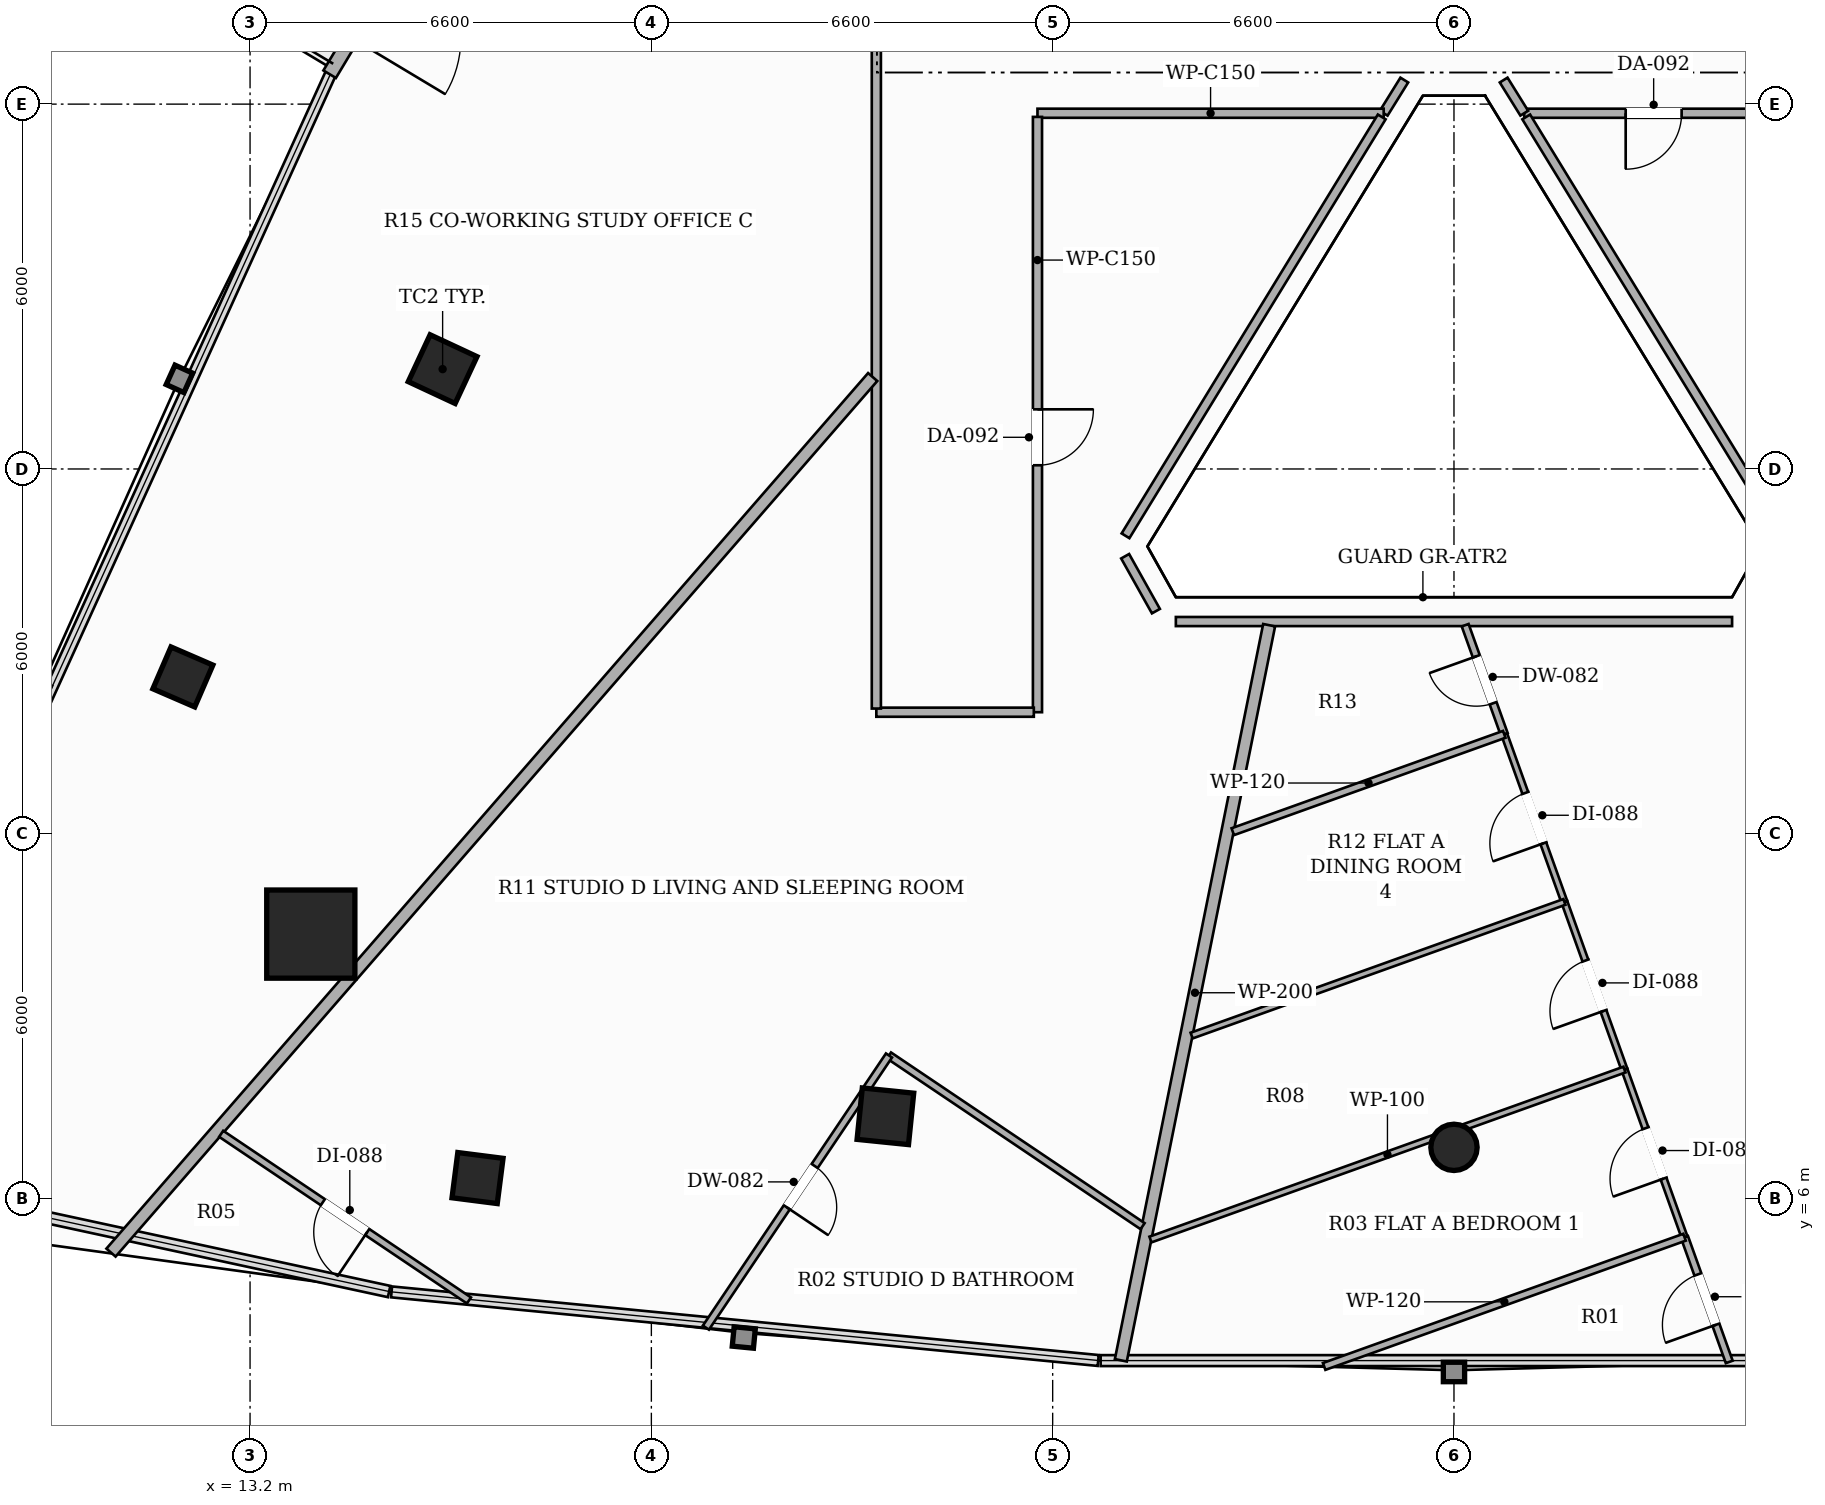
"""IFC4 building model, lengths in metres.
Left out: names, types, materials, properties, quantities, classifications, styles, units other than length and angle.
Written with IfcOpenShell. Run it as: python <this file> out.ifc"""

import sys

from ifc_helpers import new_model, si_unit, direction, frame, frame_2d, origin, origin_2d, place, context, subcontext, project, spatial, rectangle, hollow_rectangle, hollow_circle, extrude, element, fill, save


model = new_model("IFC4")
c1 = context("Model", 3, precision=1e-05, world=origin(), true_north=direction((0.0, 1.0)))
c2 = subcontext(c1, "Body", "Model", "MODEL_VIEW")
j1 = project(units=[si_unit("LENGTHUNIT", "METRE"), si_unit("PLANEANGLEUNIT", "RADIAN")], contexts=[c1])
p1 = place(None, origin())
s1 = spatial("IfcSite", under=j1, at=p1, CompositionType="ELEMENT")
p2 = place(p1, origin())
s2 = spatial("IfcBuilding", under=s1, at=p2, CompositionType="ELEMENT")
p3 = place(p2, frame((0.0, 0.0, 136.4)))
s3 = spatial("IfcBuildingStorey", under=s2, at=p3, CompositionType="ELEMENT", Elevation=136.4)
p4 = place(p3, frame((14.199, 10.351, 0.0), z_axis=(0.0, 0.0, 1.0), x_axis=(1.0, 0.0, 0.0)))
e1 = element("IfcColumn", 1, at=p4, inside=s3, PredefinedType="COLUMN", context=c2, shape_type="SweptSolid", body=[
    extrude(hollow_rectangle(XDim=1.45, YDim=1.45, WallThickness=0.045, at=origin_2d()), origin(), (0.0, 0.0, 1.0), 3.3),
])
for number, where, z_axis, x_axis in (
    (2, (16.367, 19.642, 0.0), (0.0, 0.0, 1.0), (0.423, 0.906, 0.0)),
    (3, (23.649, 7.355, 0.0), (0.0, 0.0, 1.0), (-0.995, 0.101, 0.0)),
):
    element("IfcColumn", number, at=place(p3, frame(where, z_axis=z_axis, x_axis=x_axis)), inside=s3, PredefinedType="COLUMN", context=c2, shape_type="SweptSolid", body=[
        extrude(hollow_rectangle(XDim=0.85, YDim=0.85, WallThickness=0.028, at=origin_2d()), origin(), (0.0, 0.0, 1.0), 3.3),
    ])
p5 = place(p3, frame((33.0, 6.844, 0.0), z_axis=(0.0, 0.0, 1.0), x_axis=(1.0, 0.0, 0.0)))
e4 = element("IfcColumn", 4, at=p5, inside=s3, PredefinedType="COLUMN", context=c2, shape_type="SweptSolid", body=[
    extrude(hollow_circle(Radius=0.381, WallThickness=0.022, at=origin_2d()), origin(), (0.0, 0.0, 1.0), 3.3),
])
for number, where, z_axis, x_axis in (
    (5, (12.095, 14.58, 0.0), (0.0, 0.0, 1.0), (0.397, 0.918, 0.0)),
    (6, (16.941, 6.339, 0.0), (0.0, 0.0, 1.0), (-0.992, 0.127, 0.0)),
):
    element("IfcColumn", number, at=place(p3, frame(where, z_axis=z_axis, x_axis=x_axis)), inside=s3, PredefinedType="COLUMN", context=c2, shape_type="SweptSolid", body=[
        extrude(hollow_rectangle(XDim=0.75, YDim=0.75, WallThickness=0.025, at=origin_2d()), origin(), (0.0, 0.0, 1.0), 3.3),
    ])
p6 = place(p3, frame((20.408, 34.327, 0.0), z_axis=(0.0, 0.0, 1.0), x_axis=(-0.514364263751, -0.857571807009, 0.0)))
e7 = element("IfcWall", 7, at=p6, inside=s3, PredefinedType="SOLIDWALL", context=c2, shape_type="SweptSolid", body=[
    extrude(rectangle(XDim=11.468, YDim=0.24, at=frame_2d((5.734, 0.0))), origin(), (0.0, 0.0, 1.0), 2.624),
])
p7 = place(p6, frame((8.972, 0.0, 0.0)))
e8 = element("IfcOpeningElement", 8, at=p7, cuts=e7, PredefinedType="OPENING", context=c2, shape_type="SweptSolid", body=[
    extrude(rectangle(XDim=1.8, YDim=2.2, at=frame_2d((0.9, 1.1))), frame((0.0, 0.13, 0.0), z_axis=(0.0, -1.0, 0.0), x_axis=(1.0, 0.0, 0.0)), (0.0, 0.0, 1.0), 0.26),
])
p8 = place(p3, frame((32.183, 24.396, 0.0), z_axis=(0.0, 0.0, 1.0), x_axis=(-0.527674894897, -0.849446411079, 0.0)))
e9 = element("IfcWall", 9, at=p8, inside=s3, PredefinedType="PARTITIONING", context=c2, shape_type="SweptSolid", body=[
    extrude(rectangle(XDim=0.643, YDim=0.15, at=frame_2d((0.321, 0.0))), origin(), (0.0, 0.0, 1.0), 3.06),
])
p9 = place(p3, frame((31.844, 23.85, 0.0), z_axis=(0.0, 0.0, 1.0), x_axis=(-1.0, 0.0, 0.0)))
e10 = element("IfcWall", 10, at=p9, inside=s3, PredefinedType="PARTITIONING", context=c2, shape_type="SweptSolid", body=[
    extrude(rectangle(XDim=5.694, YDim=0.15, at=frame_2d((2.847, 0.0))), origin(), (0.0, 0.0, 1.0), 2.721),
])
p10 = place(p3, frame((26.15, 23.79, 0.0), z_axis=(0.0, 0.0, 1.0), x_axis=(0.0, -1.0, 0.0)))
e11 = element("IfcWall", 11, at=p10, inside=s3, PredefinedType="PARTITIONING", context=c2, shape_type="SweptSolid", body=[
    extrude(rectangle(XDim=9.79, YDim=0.15, at=frame_2d((4.895, 0.0))), origin(), (0.0, 0.0, 1.0), 2.721),
])
p11 = place(p10, frame((4.809, 0.0, 0.0)))
e12 = element("IfcOpeningElement", 12, at=p11, cuts=e11, PredefinedType="OPENING", context=c2, shape_type="SweptSolid", body=[
    extrude(rectangle(XDim=0.92, YDim=2.15, at=frame_2d((0.46, 1.075))), frame((0.0, 0.085, 0.0), z_axis=(0.0, -1.0, 0.0), x_axis=(1.0, 0.0, 0.0)), (0.0, 0.0, 1.0), 0.17),
])
p12 = place(p3, frame((26.09, 14.0, 0.0), z_axis=(0.0, 0.0, 1.0), x_axis=(-1.0, 0.0, 0.0)))
e13 = element("IfcWall", 13, at=p12, inside=s3, PredefinedType="PARTITIONING", context=c2, shape_type="SweptSolid", body=[
    extrude(rectangle(XDim=2.59, YDim=0.15, at=frame_2d((1.295, 0.0))), origin(), (0.0, 0.0, 1.0), 2.721),
])
p13 = place(p3, frame((23.5, 14.06, 0.0), z_axis=(0.0, 0.0, 1.0), x_axis=(0.0, 1.0, 0.0)))
e14 = element("IfcWall", 14, at=p13, inside=s3, PredefinedType="PARTITIONING", context=c2, shape_type="SweptSolid", body=[
    extrude(rectangle(XDim=22.84, YDim=0.15, at=frame_2d((11.42, 0.0))), origin(), (0.0, 0.0, 1.0), 2.413),
])
p14 = place(p13, frame((13.533, 0.0, 0.0)))
e15 = element("IfcOpeningElement", 15, at=p14, cuts=e14, PredefinedType="OPENING", context=c2, shape_type="SweptSolid", body=[
    extrude(rectangle(XDim=0.88, YDim=2.1, at=frame_2d((0.44, 1.05))), frame((0.0, 0.085, 0.0), z_axis=(0.0, -1.0, 0.0), x_axis=(1.0, 0.0, 0.0)), (0.0, 0.0, 1.0), 0.17),
])
p15 = place(p3, frame((42.29, 23.85, 0.0), z_axis=(0.0, 0.0, 1.0), x_axis=(-1.0, 0.0, 0.0)))
e16 = element("IfcWall", 16, at=p15, inside=s3, PredefinedType="PARTITIONING", context=c2, shape_type="SweptSolid", body=[
    extrude(rectangle(XDim=8.134, YDim=0.15, at=frame_2d((4.067, 0.0))), origin(), (0.0, 0.0, 1.0), 2.492),
])
p16 = place(p15, frame((5.546, 0.0, 0.0)))
e17 = element("IfcOpeningElement", 17, at=p16, cuts=e16, PredefinedType="OPENING", context=c2, shape_type="SweptSolid", body=[
    extrude(rectangle(XDim=0.92, YDim=2.15, at=frame_2d((0.46, 1.075))), frame((0.0, 0.085, 0.0), z_axis=(0.0, -1.0, 0.0), x_axis=(1.0, 0.0, 0.0)), (0.0, 0.0, 1.0), 0.17),
])
p17 = place(p15, frame((1.807, 0.0, 0.0)))
e18 = element("IfcOpeningElement", 18, at=p17, cuts=e16, PredefinedType="OPENING", context=c2, shape_type="SweptSolid", body=[
    extrude(rectangle(XDim=0.92, YDim=2.15, at=frame_2d((0.46, 1.075))), frame((0.0, 0.085, 0.0), z_axis=(0.0, -1.0, 0.0), x_axis=(1.0, 0.0, 0.0)), (0.0, 0.0, 1.0), 0.17),
])
p18 = place(p3, frame((34.156, 23.851, 0.0), z_axis=(0.0, 0.0, 1.0), x_axis=(-0.528356729584, 0.849022476913, 0.0)))
e19 = element("IfcWall", 19, at=p18, inside=s3, PredefinedType="PARTITIONING", context=c2, shape_type="SweptSolid", body=[
    extrude(rectangle(XDim=0.642, YDim=0.15, at=frame_2d((0.321, 0.0))), origin(), (0.0, 0.0, 1.0), 3.06),
])
p19 = place(p3, frame((34.188, 23.79, 0.0), z_axis=(0.0, 0.0, 1.0), x_axis=(0.521816809014, -0.853057570057, 0.0)))
e20 = element("IfcWall", 20, at=p19, inside=s3, PredefinedType="PARTITIONING", context=c2, shape_type="SweptSolid", body=[
    extrude(rectangle(XDim=8.076, YDim=0.15, at=frame_2d((4.038, 0.0))), origin(), (0.0, 0.0, 1.0), 2.721),
])
p20 = place(p3, frame((37.574, 15.491, 0.0), z_axis=(0.0, 0.0, 1.0), x_axis=(-1.0, 0.0, 0.0)))
e21 = element("IfcWall", 21, at=p20, inside=s3, PredefinedType="PARTITIONING", context=c2, shape_type="SweptSolid", body=[
    extrude(rectangle(XDim=9.148, YDim=0.15, at=frame_2d((4.574, 0.0))), origin(), (0.0, 0.0, 1.0), 2.721),
])
p21 = place(p3, frame((28.098, 15.662, 0.0), z_axis=(0.0, 0.0, 1.0), x_axis=(-0.488804496818, 0.872393353878, 0.0)))
e22 = element("IfcWall", 22, at=p21, inside=s3, PredefinedType="PARTITIONING", context=c2, shape_type="SweptSolid", body=[
    extrude(rectangle(XDim=1.035, YDim=0.15, at=frame_2d((0.518, 0.0))), origin(), (0.0, 0.0, 1.0), 3.06),
])
p22 = place(p3, frame((27.598, 16.901, 0.0), z_axis=(0.0, 0.0, 1.0), x_axis=(0.521816809014, 0.853057570057, 0.0)))
e23 = element("IfcWall", 23, at=p22, inside=s3, PredefinedType="PARTITIONING", context=c2, shape_type="SweptSolid", body=[
    extrude(rectangle(XDim=8.076, YDim=0.15, at=frame_2d((4.038, 0.0))), origin(), (0.0, 0.0, 1.0), 2.721),
])
p23 = place(p3, frame((27.521, 3.342, 0.0), z_axis=(0.0, 0.0, 1.0), x_axis=(0.197768112081, 0.980248832615, 0.0)))
e24 = element("IfcWall", 24, at=p23, inside=s3, PredefinedType="PARTITIONING", context=c2, shape_type="SweptSolid", body=[
    extrude(rectangle(XDim=12.333, YDim=0.2, at=frame_2d((6.166, 0.0))), origin(), (0.0, 0.0, 1.0), 2.413),
])
p24 = place(p3, frame((23.44, 19.512, 0.0), z_axis=(0.0, 0.0, 1.0), x_axis=(-0.656359216658, -0.754448526215, 0.0)))
e25 = element("IfcWall", 25, at=p24, inside=s3, PredefinedType="PARTITIONING", context=c2, shape_type="SweptSolid", body=[
    extrude(rectangle(XDim=19.085, YDim=0.2, at=frame_2d((9.543, 0.0))), origin(), (0.0, 0.0, 1.0), 2.413),
])
p25 = place(p3, frame((33.827, 13.636, 0.0), z_axis=(0.0, 0.0, 1.0), x_axis=(-0.337163686904, 0.941446041063, 0.0)))
e26 = element("IfcWall", 26, at=p25, inside=s3, PredefinedType="PARTITIONING", context=c2, shape_type="SweptSolid", body=[
    extrude(rectangle(XDim=1.906, YDim=0.12, at=frame_2d((0.953, 0.0))), origin(), (0.0, 0.0, 1.0), 2.721),
])
p26 = place(p25, frame((0.543, 0.0, 0.0)))
e27 = element("IfcOpeningElement", 27, at=p26, cuts=e26, PredefinedType="OPENING", context=c2, shape_type="SweptSolid", body=[
    extrude(rectangle(XDim=0.82, YDim=2.1, at=frame_2d((0.41, 1.05))), frame((0.0, 0.07, 0.0), z_axis=(0.0, -1.0, 0.0), x_axis=(1.0, 0.0, 0.0)), (0.0, 0.0, 1.0), 0.14),
])
p27 = place(p3, frame((37.527, 3.315, 0.0), z_axis=(0.0, 0.0, 1.0), x_axis=(-0.337393850622, 0.9413635799, 0.0)))
e28 = element("IfcWall", 28, at=p27, inside=s3, PredefinedType="PARTITIONING", context=c2, shape_type="SweptSolid", body=[
    extrude(rectangle(XDim=2.179, YDim=0.12, at=frame_2d((1.089, 0.0))), origin(), (0.0, 0.0, 1.0), 3.06),
])
p28 = place(p27, frame((0.649, 0.0, 0.0)))
e29 = element("IfcOpeningElement", 29, at=p28, cuts=e28, PredefinedType="OPENING", context=c2, shape_type="SweptSolid", body=[
    extrude(rectangle(XDim=0.88, YDim=2.1, at=frame_2d((0.44, 1.05))), frame((0.0, 0.07, 0.0), z_axis=(0.0, -1.0, 0.0), x_axis=(1.0, 0.0, 0.0)), (0.0, 0.0, 1.0), 0.14),
])
p29 = place(p3, frame((36.792, 5.366, 0.0), z_axis=(0.0, 0.0, 1.0), x_axis=(-0.33735537207, 0.941377370099, 0.0)))
e30 = element("IfcWall", 30, at=p29, inside=s3, PredefinedType="PARTITIONING", context=c2, shape_type="SweptSolid", body=[
    extrude(rectangle(XDim=2.929, YDim=0.1, at=frame_2d((1.464, 0.0))), origin(), (0.0, 0.0, 1.0), 2.413),
])
p30 = place(p29, frame((1.024, 0.0, 0.0)))
e31 = element("IfcOpeningElement", 31, at=p30, cuts=e30, PredefinedType="OPENING", context=c2, shape_type="SweptSolid", body=[
    extrude(rectangle(XDim=0.88, YDim=2.1, at=frame_2d((0.44, 1.05))), frame((0.0, 0.06, 0.0), z_axis=(0.0, -1.0, 0.0), x_axis=(1.0, 0.0, 0.0)), (0.0, 0.0, 1.0), 0.12),
])
p31 = place(p3, frame((35.804, 8.123, 0.0), z_axis=(0.0, 0.0, 1.0), x_axis=(-0.337381847176, 0.941367881965, 0.0)))
e32 = element("IfcWall", 32, at=p31, inside=s3, PredefinedType="PARTITIONING", context=c2, shape_type="SweptSolid", body=[
    extrude(rectangle(XDim=2.928, YDim=0.1, at=frame_2d((1.464, 0.0))), origin(), (0.0, 0.0, 1.0), 3.06),
])
p32 = place(p31, frame((1.024, 0.0, 0.0)))
e33 = element("IfcOpeningElement", 33, at=p32, cuts=e32, PredefinedType="OPENING", context=c2, shape_type="SweptSolid", body=[
    extrude(rectangle(XDim=0.88, YDim=2.1, at=frame_2d((0.44, 1.05))), frame((0.0, 0.06, 0.0), z_axis=(0.0, -1.0, 0.0), x_axis=(1.0, 0.0, 0.0)), (0.0, 0.0, 1.0), 0.12),
])
p33 = place(p3, frame((34.816, 10.88, 0.0), z_axis=(0.0, 0.0, 1.0), x_axis=(-0.337756804272, 0.941233414817, 0.0)))
e34 = element("IfcWall", 34, at=p33, inside=s3, PredefinedType="PARTITIONING", context=c2, shape_type="SweptSolid", body=[
    extrude(rectangle(XDim=2.928, YDim=0.1, at=frame_2d((1.464, 0.0))), origin(), (0.0, 0.0, 1.0), 3.06),
])
p34 = place(p33, frame((1.024, 0.0, 0.0)))
e35 = element("IfcOpeningElement", 35, at=p34, cuts=e34, PredefinedType="OPENING", context=c2, shape_type="SweptSolid", body=[
    extrude(rectangle(XDim=0.88, YDim=2.1, at=frame_2d((0.44, 1.05))), frame((0.0, 0.06, 0.0), z_axis=(0.0, -1.0, 0.0), x_axis=(1.0, 0.0, 0.0)), (0.0, 0.0, 1.0), 0.12),
])
p35 = place(p3, frame((33.827, 13.636, 0.0), z_axis=(0.0, 0.0, 1.0), x_axis=(-0.941307932725, -0.337549071676, 0.0)))
e36 = element("IfcWall", 36, at=p35, inside=s3, PredefinedType="PARTITIONING", context=c2, shape_type="SweptSolid", body=[
    extrude(rectangle(XDim=4.743, YDim=0.12, at=frame_2d((2.372, 0.0))), origin(), (0.0, 0.0, 1.0), 2.721),
])
p36 = place(p3, frame((30.865, 3.241, 0.0), z_axis=(0.0, 0.0, 1.0), x_axis=(0.941328015911, 0.337493061354, 0.0)))
e37 = element("IfcWall", 37, at=p36, inside=s3, PredefinedType="PARTITIONING", context=c2, shape_type="SweptSolid", body=[
    extrude(rectangle(XDim=6.296, YDim=0.12, at=frame_2d((3.148, 0.0))), origin(), (0.0, 0.0, 1.0), 2.619),
])
p37 = place(p3, frame((28.008, 5.328, 0.0), z_axis=(0.0, 0.0, 1.0), x_axis=(0.941323677897, 0.337505160599, 0.0)))
e38 = element("IfcWall", 38, at=p37, inside=s3, PredefinedType="PARTITIONING", context=c2, shape_type="SweptSolid", body=[
    extrude(rectangle(XDim=8.282, YDim=0.1, at=frame_2d((4.141, 0.0))), origin(), (0.0, 0.0, 1.0), 2.413),
])
p38 = place(p3, frame((28.685, 8.682, 0.0), z_axis=(0.0, 0.0, 1.0), x_axis=(0.94133243901, 0.337480724291, 0.0)))
e39 = element("IfcWall", 39, at=p38, inside=s3, PredefinedType="PARTITIONING", context=c2, shape_type="SweptSolid", body=[
    extrude(rectangle(XDim=6.513, YDim=0.1, at=frame_2d((3.256, 0.0))), origin(), (0.0, 0.0, 1.0), 2.721),
])
p39 = place(p3, frame((27.879, 5.548, 0.0), z_axis=(0.0, 0.0, 1.0), x_axis=(-0.829629274352, 0.558314666777, 0.0)))
e40 = element("IfcWall", 40, at=p39, inside=s3, PredefinedType="PARTITIONING", context=c2, shape_type="SweptSolid", body=[
    extrude(rectangle(XDim=5.027, YDim=0.12, at=frame_2d((2.514, 0.0))), origin(), (0.0, 0.0, 1.0), 2.413),
])
p40 = place(p3, frame((23.708, 8.355, 0.0), z_axis=(0.0, 0.0, 1.0), x_axis=(-0.55815233332, -0.829738496642, 0.0)))
e41 = element("IfcWall", 41, at=p40, inside=s3, PredefinedType="PARTITIONING", context=c2, shape_type="SweptSolid", body=[
    extrude(rectangle(XDim=5.395, YDim=0.12, at=frame_2d((2.697, 0.0))), origin(), (0.0, 0.0, 1.0), 2.413),
])
p41 = place(p40, frame((2.19, 0.0, 0.0)))
e42 = element("IfcOpeningElement", 42, at=p41, cuts=e41, PredefinedType="OPENING", context=c2, shape_type="SweptSolid", body=[
    extrude(rectangle(XDim=0.82, YDim=2.1, at=frame_2d((0.41, 1.05))), frame((0.0, 0.07, 0.0), z_axis=(0.0, -1.0, 0.0), x_axis=(1.0, 0.0, 0.0)), (0.0, 0.0, 1.0), 0.14),
])
p42 = place(p3, frame((16.8, 4.326, 0.0), z_axis=(0.0, 0.0, 1.0), x_axis=(-0.829756434678, 0.558125666056, 0.0)))
e43 = element("IfcWall", 43, at=p42, inside=s3, PredefinedType="PARTITIONING", context=c2, shape_type="SweptSolid", body=[
    extrude(rectangle(XDim=4.911, YDim=0.12, at=frame_2d((2.456, 0.0))), origin(), (0.0, 0.0, 1.0), 3.06),
])
p43 = place(p42, frame((2.016, 0.0, 0.0)))
e44 = element("IfcOpeningElement", 44, at=p43, cuts=e43, PredefinedType="OPENING", context=c2, shape_type="SweptSolid", body=[
    extrude(rectangle(XDim=0.88, YDim=2.1, at=frame_2d((0.44, 1.05))), frame((0.0, 0.07, 0.0), z_axis=(0.0, -1.0, 0.0), x_axis=(1.0, 0.0, 0.0)), (0.0, 0.0, 1.0), 0.14),
])
p44 = place(p16, origin())
e45 = element("IfcDoor", 45, at=p44, inside=s3, OperationType="SINGLE_SWING_RIGHT", PredefinedType="DOOR", context=c2, shape_type="SweptSolid", body=[
    extrude(rectangle(XDim=0.92, YDim=2.15, at=frame_2d((0.46, 1.075))), frame((0.0, 0.025, 0.0), z_axis=(0.0, -1.0, 0.0), x_axis=(1.0, 0.0, 0.0)), (0.0, 0.0, 1.0), 0.05),
])
fill(e17, e45)
p45 = place(p26, origin())
e46 = element("IfcDoor", 46, at=p45, inside=s3, OperationType="SINGLE_SWING_RIGHT", PredefinedType="DOOR", context=c2, shape_type="SweptSolid", body=[
    extrude(rectangle(XDim=0.82, YDim=2.1, at=frame_2d((0.41, 1.05))), frame((0.0, 0.025, 0.0), z_axis=(0.0, -1.0, 0.0), x_axis=(1.0, 0.0, 0.0)), (0.0, 0.0, 1.0), 0.05),
])
fill(e27, e46)
p46 = place(p28, origin())
e47 = element("IfcDoor", 47, at=p46, inside=s3, OperationType="SINGLE_SWING_LEFT", PredefinedType="DOOR", context=c2, shape_type="SweptSolid", body=[
    extrude(rectangle(XDim=0.88, YDim=2.1, at=frame_2d((0.44, 1.05))), frame((0.0, 0.025, 0.0), z_axis=(0.0, -1.0, 0.0), x_axis=(1.0, 0.0, 0.0)), (0.0, 0.0, 1.0), 0.05),
])
fill(e29, e47)
p47 = place(p30, origin())
e48 = element("IfcDoor", 48, at=p47, inside=s3, OperationType="SINGLE_SWING_LEFT", PredefinedType="DOOR", context=c2, shape_type="SweptSolid", body=[
    extrude(rectangle(XDim=0.88, YDim=2.1, at=frame_2d((0.44, 1.05))), frame((0.0, 0.025, 0.0), z_axis=(0.0, -1.0, 0.0), x_axis=(1.0, 0.0, 0.0)), (0.0, 0.0, 1.0), 0.05),
])
fill(e31, e48)
p48 = place(p32, origin())
e49 = element("IfcDoor", 49, at=p48, inside=s3, OperationType="SINGLE_SWING_LEFT", PredefinedType="DOOR", context=c2, shape_type="SweptSolid", body=[
    extrude(rectangle(XDim=0.88, YDim=2.1, at=frame_2d((0.44, 1.05))), frame((0.0, 0.025, 0.0), z_axis=(0.0, -1.0, 0.0), x_axis=(1.0, 0.0, 0.0)), (0.0, 0.0, 1.0), 0.05),
])
fill(e33, e49)
p49 = place(p34, origin())
e50 = element("IfcDoor", 50, at=p49, inside=s3, OperationType="SINGLE_SWING_LEFT", PredefinedType="DOOR", context=c2, shape_type="SweptSolid", body=[
    extrude(rectangle(XDim=0.88, YDim=2.1, at=frame_2d((0.44, 1.05))), frame((0.0, 0.025, 0.0), z_axis=(0.0, -1.0, 0.0), x_axis=(1.0, 0.0, 0.0)), (0.0, 0.0, 1.0), 0.05),
])
fill(e35, e50)
p50 = place(p11, origin())
e51 = element("IfcDoor", 51, at=p50, inside=s3, OperationType="SINGLE_SWING_LEFT", PredefinedType="DOOR", context=c2, shape_type="SweptSolid", body=[
    extrude(rectangle(XDim=0.92, YDim=2.15, at=frame_2d((0.46, 1.075))), frame((0.0, 0.025, 0.0), z_axis=(0.0, -1.0, 0.0), x_axis=(1.0, 0.0, 0.0)), (0.0, 0.0, 1.0), 0.05),
])
fill(e12, e51)
p51 = place(p41, origin())
e52 = element("IfcDoor", 52, at=p51, inside=s3, OperationType="SINGLE_SWING_RIGHT", PredefinedType="DOOR", context=c2, shape_type="SweptSolid", body=[
    extrude(rectangle(XDim=0.82, YDim=2.1, at=frame_2d((0.41, 1.05))), frame((0.0, 0.025, 0.0), z_axis=(0.0, -1.0, 0.0), x_axis=(1.0, 0.0, 0.0)), (0.0, 0.0, 1.0), 0.05),
])
fill(e42, e52)
p52 = place(p43, origin())
e53 = element("IfcDoor", 53, at=p52, inside=s3, OperationType="SINGLE_SWING_LEFT", PredefinedType="DOOR", context=c2, shape_type="SweptSolid", body=[
    extrude(rectangle(XDim=0.88, YDim=2.1, at=frame_2d((0.44, 1.05))), frame((0.0, 0.025, 0.0), z_axis=(0.0, -1.0, 0.0), x_axis=(1.0, 0.0, 0.0)), (0.0, 0.0, 1.0), 0.05),
])
fill(e44, e53)
save(model, sys.argv[1])
